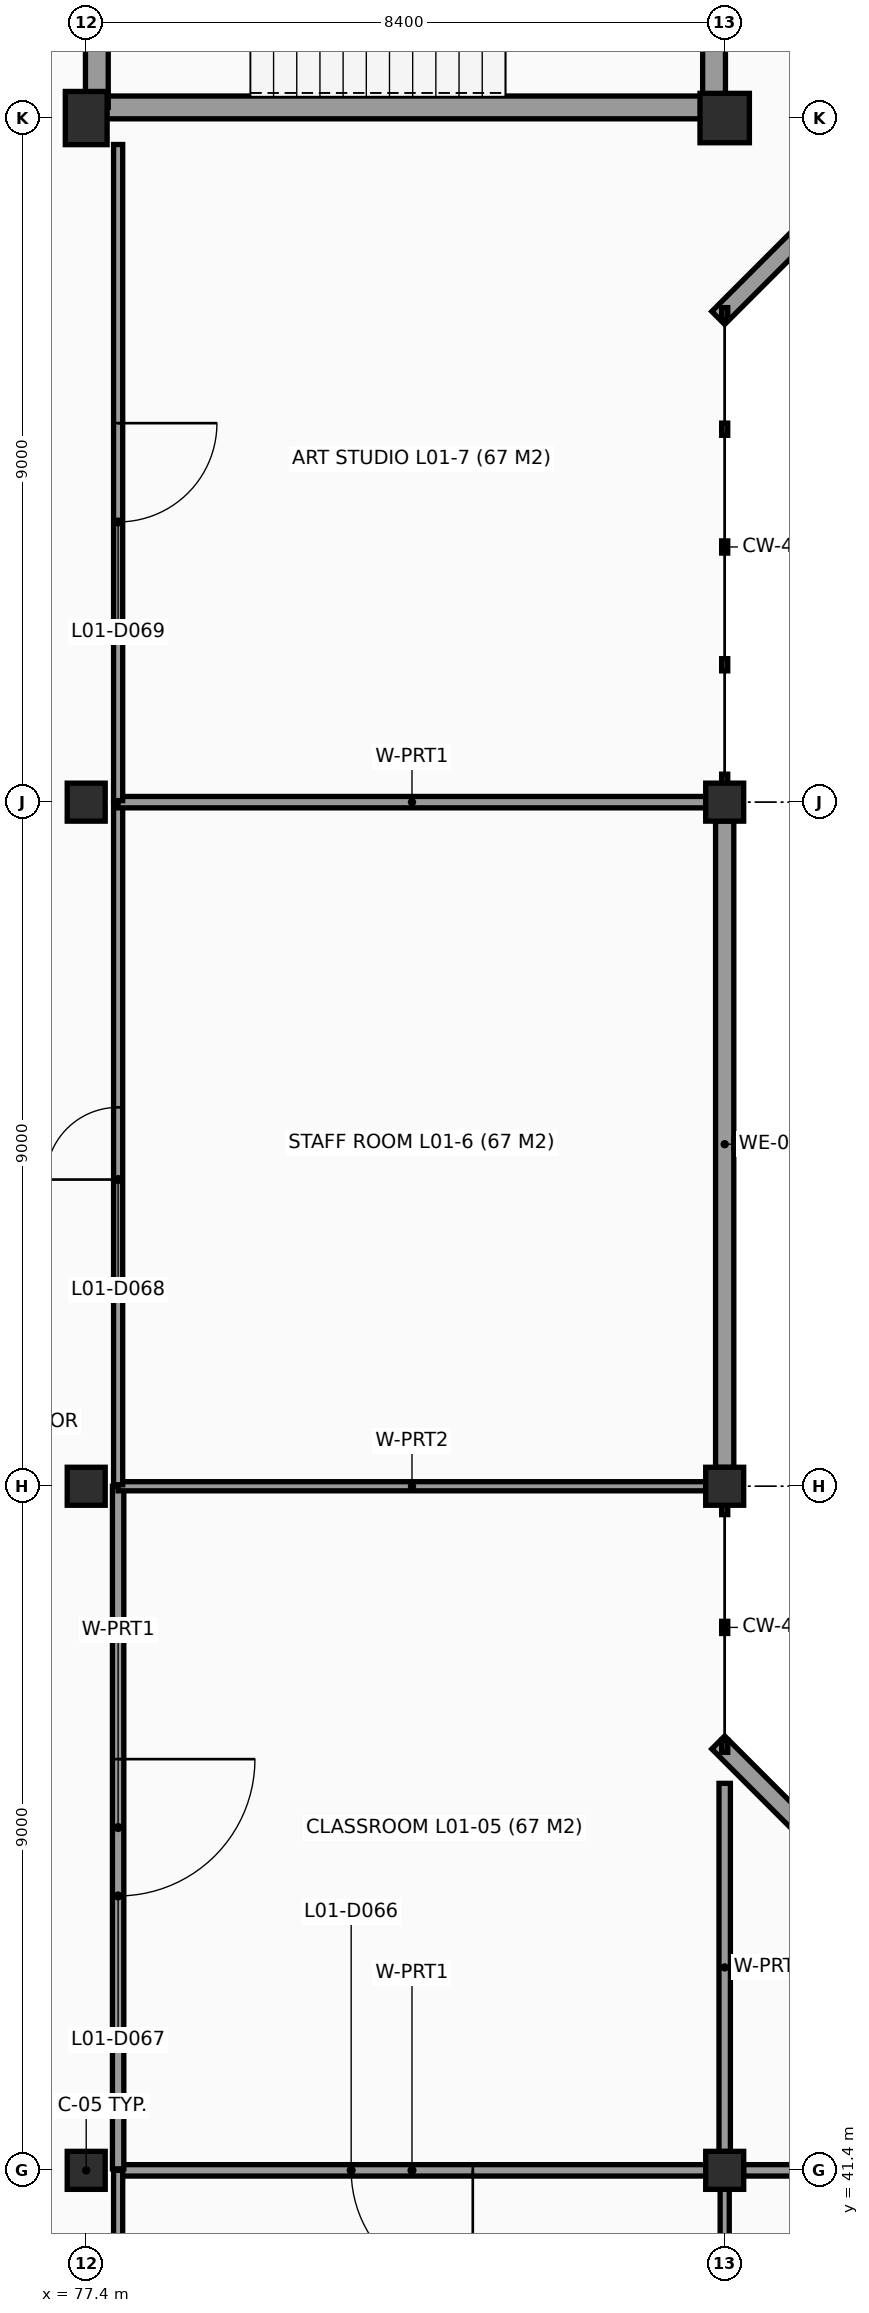
"""IFC4 building model, lengths in metres.
Left out: names, types, materials, properties, quantities, classifications, styles, units other than length and angle.
Written with IfcOpenShell. Run it as: python <this file> out.ifc"""

import sys

from ifc_helpers import new_model, si_unit, direction, frame, frame_2d, origin, origin_2d, place, context, subcontext, project, spatial, rectangle, extrude, element, fill, save


model = new_model("IFC4")
c1 = context("Model", 3, precision=1e-05, world=origin(), true_north=direction((0.0, 1.0)))
c2 = subcontext(c1, "Body", "Model", "MODEL_VIEW")
j1 = project(units=[si_unit("LENGTHUNIT", "METRE"), si_unit("PLANEANGLEUNIT", "RADIAN")], contexts=[c1])
p1 = place(None, origin())
s1 = spatial("IfcSite", under=j1, at=p1, CompositionType="ELEMENT")
p2 = place(p1, origin())
s2 = spatial("IfcBuilding", under=s1, at=p2, CompositionType="ELEMENT")
p3 = place(p2, frame((0.0, 0.0, 4.2)))
s3 = spatial("IfcBuildingStorey", under=s2, at=p3, CompositionType="ELEMENT", Elevation=4.2)
for number, where, z_axis, x_axis in (
    (1, (77.4, 41.4, 0.0), (0.0, 0.0, 1.0), (1.0, 0.0, 0.0)),
    (2, (77.4, 50.4, 0.0), (0.0, 0.0, 1.0), (1.0, 0.0, 0.0)),
    (3, (77.4, 59.4, 0.0), (0.0, 0.0, 1.0), (1.0, 0.0, 0.0)),
):
    element("IfcColumn", number, at=place(p3, frame(where, z_axis=z_axis, x_axis=x_axis)), inside=s3, PredefinedType="COLUMN", context=c2, shape_type="SweptSolid", body=[
        extrude(rectangle(XDim=0.5, YDim=0.5, at=origin_2d()), origin(), (0.0, 0.0, 1.0), 3.6),
    ])
p4 = place(p3, frame((77.4, 68.4, 0.0), z_axis=(0.0, 0.0, 1.0), x_axis=(1.0, 0.0, 0.0)))
e4 = element("IfcColumn", 4, at=p4, inside=s3, PredefinedType="COLUMN", context=c2, shape_type="SweptSolid", body=[
    extrude(rectangle(XDim=0.55, YDim=0.7, at=origin_2d()), origin(), (0.0, 0.0, 1.0), 3.6),
])
for number, where, z_axis, x_axis in (
    (5, (85.8, 41.4, 0.0), (0.0, 0.0, 1.0), (1.0, 0.0, 0.0)),
    (6, (85.8, 50.4, 0.0), (0.0, 0.0, 1.0), (1.0, 0.0, 0.0)),
    (7, (85.8, 59.4, 0.0), (0.0, 0.0, 1.0), (1.0, 0.0, 0.0)),
):
    element("IfcColumn", number, at=place(p3, frame(where, z_axis=z_axis, x_axis=x_axis)), inside=s3, PredefinedType="COLUMN", context=c2, shape_type="SweptSolid", body=[
        extrude(rectangle(XDim=0.5, YDim=0.5, at=origin_2d()), origin(), (0.0, 0.0, 1.0), 3.6),
    ])
p5 = place(p3, frame((85.8, 68.4, 0.0), z_axis=(0.0, 0.0, 1.0), x_axis=(1.0, 0.0, 0.0)))
e8 = element("IfcColumn", 8, at=p5, inside=s3, PredefinedType="COLUMN", context=c2, shape_type="SweptSolid", body=[
    extrude(rectangle(XDim=0.65, YDim=0.65, at=origin_2d()), origin(), (0.0, 0.0, 1.0), 3.6),
])
p6 = place(p3, frame((91.429, 71.485, 0.0), z_axis=(0.0, 0.0, 1.0), x_axis=(-0.707106781187, -0.707106781187, 0.0)))
e9 = element("IfcWall", 9, at=p6, inside=s3, PredefinedType="SOLIDWALL", context=c2, shape_type="SweptSolid", body=[
    extrude(rectangle(XDim=8.081, YDim=0.24, at=frame_2d((4.04, 0.0))), origin(), (0.0, 0.0, 1.0), 2.52),
])
p7 = place(p3, frame((85.8, 59.152, 0.0), z_axis=(0.0, 0.0, 1.0), x_axis=(0.0, -1.0, 0.0)))
e10 = element("IfcWall", 10, at=p7, inside=s3, PredefinedType="SOLIDWALL", context=c2, shape_type="SweptSolid", body=[
    extrude(rectangle(XDim=8.504, YDim=0.24, at=frame_2d((4.252, 0.0))), origin(), (0.0, 0.0, 1.0), 2.62),
])
p8 = place(p3, frame((85.715, 47.029, 0.0), z_axis=(0.0, 0.0, 1.0), x_axis=(0.707121887885, -0.707091674165, 0.0)))
e11 = element("IfcWall", 11, at=p8, inside=s3, PredefinedType="SOLIDWALL", context=c2, shape_type="SweptSolid", body=[
    extrude(rectangle(XDim=8.081, YDim=0.24, at=frame_2d((4.04, 0.0))), origin(), (0.0, 0.0, 1.0), 2.87),
])
p9 = place(p8, frame((2.39, 0.0, 0.95)))
e12 = element("IfcOpeningElement", 12, at=p9, cuts=e11, PredefinedType="OPENING", context=c2, shape_type="SweptSolid", body=[
    extrude(rectangle(XDim=3.3, YDim=1.2, at=frame_2d((1.65, 0.6))), frame((0.0, 0.13, 0.0), z_axis=(0.0, -1.0, 0.0), x_axis=(1.0, 0.0, 0.0)), (0.0, 0.0, 1.0), 0.26),
])
p10 = place(p3, frame((77.54, 68.54, 0.0), z_axis=(0.0, 0.0, 1.0), x_axis=(1.0, 0.0, 0.0)))
e13 = element("IfcWall", 13, at=p10, inside=s3, PredefinedType="SHEAR", context=c2, shape_type="SweptSolid", body=[
    extrude(rectangle(XDim=8.12, YDim=0.3, at=frame_2d((4.06, 0.0))), origin(), (0.0, 0.0, 1.0), 3.6),
])
for number, where, z_axis, x_axis in (
    (14, (85.66, 68.54, 0.0), (0.0, 0.0, 1.0), (0.0, 1.0, 0.0)),
    (15, (77.54, 72.74, 0.0), (0.0, 0.0, 1.0), (0.0, -1.0, 0.0)),
):
    element("IfcWall", number, at=place(p3, frame(where, z_axis=z_axis, x_axis=x_axis)), inside=s3, PredefinedType="SHEAR", context=c2, shape_type="SweptSolid", body=[
        extrude(rectangle(XDim=4.2, YDim=0.3, at=frame_2d((2.1, 0.0))), origin(), (0.0, 0.0, 1.0), 3.6),
    ])
p11 = place(p3, frame((77.82, 41.4, 0.0), z_axis=(0.0, 0.0, 1.0), x_axis=(1.0, 0.0, 0.0)))
e16 = element("IfcWall", 16, at=p11, inside=s3, PredefinedType="PARTITIONING", context=c2, shape_type="SweptSolid", body=[
    extrude(rectangle(XDim=7.732, YDim=0.15, at=frame_2d((3.866, 0.0))), origin(), (0.0, 0.0, 1.0), 2.87),
])
p12 = place(p11, frame((3.066, 0.0, 0.0)))
e17 = element("IfcOpeningElement", 17, at=p12, cuts=e16, PredefinedType="OPENING", context=c2, shape_type="SweptSolid", body=[
    extrude(rectangle(XDim=1.6, YDim=2.2, at=frame_2d((0.8, 1.1))), frame((0.0, 0.085, 0.0), z_axis=(0.0, -1.0, 0.0), x_axis=(1.0, 0.0, 0.0)), (0.0, 0.0, 1.0), 0.17),
])
p13 = place(p3, frame((85.8, 41.152, 0.0), z_axis=(0.0, 0.0, 1.0), x_axis=(0.0, -1.0, 0.0)))
e18 = element("IfcWall", 18, at=p13, inside=s3, PredefinedType="PARTITIONING", context=c2, shape_type="SweptSolid", body=[
    extrude(rectangle(XDim=8.429, YDim=0.12, at=frame_2d((4.215, 0.0))), origin(), (0.0, 0.0, 1.0), 2.92),
])
p14 = place(p3, frame((77.82, 32.723, 0.0), z_axis=(0.0, 0.0, 1.0), x_axis=(0.0, 1.0, 0.0)))
e19 = element("IfcWall", 19, at=p14, inside=s3, PredefinedType="PARTITIONING", context=c2, shape_type="SweptSolid", body=[
    extrude(rectangle(XDim=8.677, YDim=0.12, at=frame_2d((4.338, 0.0))), origin(), (0.0, 0.0, 1.0), 2.87),
])
p15 = place(p3, frame((77.82, 41.42, 0.0), z_axis=(0.0, 0.0, 1.0), x_axis=(0.0, 1.0, 0.0)))
e20 = element("IfcWall", 20, at=p15, inside=s3, PredefinedType="PARTITIONING", context=c2, shape_type="SweptSolid", body=[
    extrude(rectangle(XDim=8.98, YDim=0.15, at=frame_2d((4.49, 0.0))), origin(), (0.0, 0.0, 1.0), 2.87),
])
p16 = place(p15, frame((3.59, 0.0, 0.0)))
e21 = element("IfcOpeningElement", 21, at=p16, cuts=e20, PredefinedType="OPENING", context=c2, shape_type="SweptSolid", body=[
    extrude(rectangle(XDim=1.8, YDim=2.25, at=frame_2d((0.9, 1.125))), frame((0.0, 0.085, 0.0), z_axis=(0.0, -1.0, 0.0), x_axis=(1.0, 0.0, 0.0)), (0.0, 0.0, 1.0), 0.17),
])
p17 = place(p3, frame((77.82, 50.4, 0.0), z_axis=(0.0, 0.0, 1.0), x_axis=(1.0, 0.0, 0.0)))
e22 = element("IfcWall", 22, at=p17, inside=s3, PredefinedType="PARTITIONING", context=c2, shape_type="SweptSolid", body=[
    extrude(rectangle(XDim=7.732, YDim=0.12, at=frame_2d((3.866, 0.0))), origin(), (0.0, 0.0, 1.0), 2.93),
])
p18 = place(p3, frame((85.8, 46.491, 0.0), z_axis=(0.0, 0.0, 1.0), x_axis=(0.0, -1.0, 0.0)))
e23 = element("IfcWall", 23, at=p18, inside=s3, PredefinedType="PARTITIONING", context=c2, shape_type="SweptSolid", body=[
    extrude(rectangle(XDim=4.844, YDim=0.15, at=frame_2d((2.422, 0.0))), origin(), (0.0, 0.0, 1.0), 2.92),
])
p19 = place(p3, frame((77.82, 50.42, 0.0), z_axis=(0.0, 0.0, 1.0), x_axis=(0.0, 1.0, 0.0)))
e24 = element("IfcWall", 24, at=p19, inside=s3, PredefinedType="PARTITIONING", context=c2, shape_type="SweptSolid", body=[
    extrude(rectangle(XDim=8.98, YDim=0.12, at=frame_2d((4.49, 0.0))), origin(), (0.0, 0.0, 1.0), 2.57),
])
p20 = place(p19, frame((4.015, 0.0, 0.0)))
e25 = element("IfcOpeningElement", 25, at=p20, cuts=e24, PredefinedType="OPENING", context=c2, shape_type="SweptSolid", body=[
    extrude(rectangle(XDim=0.95, YDim=2.1, at=frame_2d((0.475, 1.05))), frame((0.0, 0.07, 0.0), z_axis=(0.0, -1.0, 0.0), x_axis=(1.0, 0.0, 0.0)), (0.0, 0.0, 1.0), 0.14),
])
p21 = place(p3, frame((77.82, 59.4, 0.0), z_axis=(0.0, 0.0, 1.0), x_axis=(1.0, 0.0, 0.0)))
e26 = element("IfcWall", 26, at=p21, inside=s3, PredefinedType="PARTITIONING", context=c2, shape_type="SweptSolid", body=[
    extrude(rectangle(XDim=7.732, YDim=0.15, at=frame_2d((3.866, 0.0))), origin(), (0.0, 0.0, 1.0), 2.57),
])
p22 = place(p3, frame((77.82, 59.42, 0.0), z_axis=(0.0, 0.0, 1.0), x_axis=(0.0, 1.0, 0.0)))
e27 = element("IfcWall", 27, at=p22, inside=s3, PredefinedType="PARTITIONING", context=c2, shape_type="SweptSolid", body=[
    extrude(rectangle(XDim=8.632, YDim=0.12, at=frame_2d((4.316, 0.0))), origin(), (0.0, 0.0, 1.0), 2.57),
])
p23 = place(p22, frame((3.666, 0.0, 0.0)))
e28 = element("IfcOpeningElement", 28, at=p23, cuts=e27, PredefinedType="OPENING", context=c2, shape_type="SweptSolid", body=[
    extrude(rectangle(XDim=1.3, YDim=2.15, at=frame_2d((0.65, 1.075))), frame((0.0, 0.07, 0.0), z_axis=(0.0, -1.0, 0.0), x_axis=(1.0, 0.0, 0.0)), (0.0, 0.0, 1.0), 0.14),
])
p24 = place(p3, frame((86.048, 41.4, 0.0), z_axis=(0.0, 0.0, 1.0), x_axis=(1.0, 0.0, 0.0)))
e29 = element("IfcWall", 29, at=p24, inside=s3, PredefinedType="PARTITIONING", context=c2, shape_type="SweptSolid", body=[
    extrude(rectangle(XDim=4.844, YDim=0.15, at=frame_2d((2.422, 0.0))), origin(), (0.0, 0.0, 1.0), 2.87),
])
p25 = place(p12, origin())
e30 = element("IfcDoor", 30, at=p25, inside=s3, OperationType="DOUBLE_DOOR_SINGLE_SWING", PredefinedType="DOOR", context=c2, shape_type="SweptSolid", body=[
    extrude(rectangle(XDim=1.6, YDim=2.2, at=frame_2d((0.8, 1.1))), frame((0.0, 0.025, 0.0), z_axis=(0.0, -1.0, 0.0), x_axis=(1.0, 0.0, 0.0)), (0.0, 0.0, 1.0), 0.05),
])
fill(e17, e30)
p26 = place(p16, origin())
e31 = element("IfcDoor", 31, at=p26, inside=s3, OperationType="DOUBLE_DOOR_SINGLE_SWING", PredefinedType="DOOR", context=c2, shape_type="SweptSolid", body=[
    extrude(rectangle(XDim=1.8, YDim=2.25, at=frame_2d((0.9, 1.125))), frame((0.0, 0.025, 0.0), z_axis=(0.0, -1.0, 0.0), x_axis=(1.0, 0.0, 0.0)), (0.0, 0.0, 1.0), 0.05),
])
fill(e21, e31)
p27 = place(p20, origin())
e32 = element("IfcDoor", 32, at=p27, inside=s3, OperationType="SINGLE_SWING_LEFT", PredefinedType="DOOR", context=c2, shape_type="SweptSolid", body=[
    extrude(rectangle(XDim=0.95, YDim=2.1, at=frame_2d((0.475, 1.05))), frame((0.0, 0.025, 0.0), z_axis=(0.0, -1.0, 0.0), x_axis=(1.0, 0.0, 0.0)), (0.0, 0.0, 1.0), 0.05),
])
fill(e25, e32)
p28 = place(p23, origin())
e33 = element("IfcDoor", 33, at=p28, inside=s3, OperationType="SINGLE_SWING_RIGHT", PredefinedType="DOOR", context=c2, shape_type="SweptSolid", body=[
    extrude(rectangle(XDim=1.3, YDim=2.15, at=frame_2d((0.65, 1.075))), frame((0.0, 0.025, 0.0), z_axis=(0.0, -1.0, 0.0), x_axis=(1.0, 0.0, 0.0)), (0.0, 0.0, 1.0), 0.05),
])
fill(e28, e33)
save(model, sys.argv[1])
